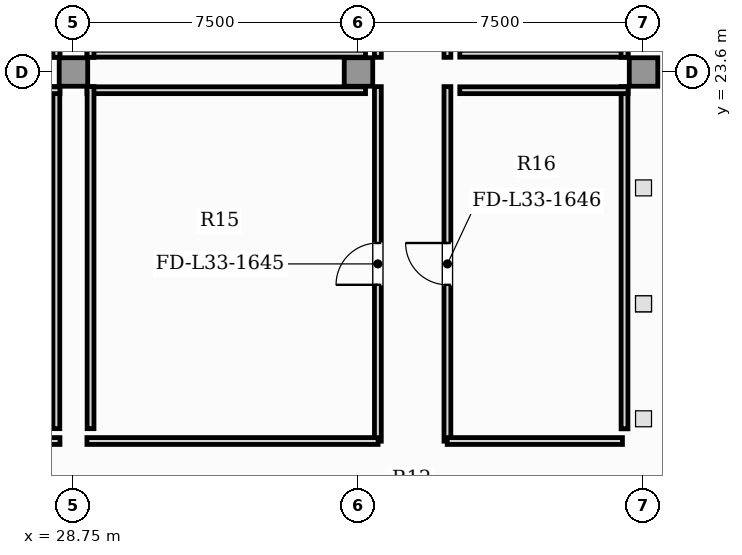
"""IFC4 building model, lengths in metres.
Left out: names, types, materials, properties, quantities, classifications, styles, units other than length and angle.
Written with IfcOpenShell. Run it as: python <this file> out.ifc"""

import sys

from ifc_helpers import new_model, si_unit, direction, frame, frame_2d, origin, origin_2d, place, context, subcontext, project, spatial, rectangle, extrude, element, fill, save


model = new_model("IFC4")
c1 = context("Model", 3, precision=1e-05, world=origin(), true_north=direction((0.0, 1.0)))
c2 = subcontext(c1, "Body", "Model", "MODEL_VIEW")
j1 = project(units=[si_unit("LENGTHUNIT", "METRE"), si_unit("PLANEANGLEUNIT", "RADIAN")], contexts=[c1])
p1 = place(None, origin())
s1 = spatial("IfcSite", under=j1, at=p1, CompositionType="ELEMENT")
p2 = place(p1, origin())
s2 = spatial("IfcBuilding", under=s1, at=p2, CompositionType="ELEMENT")
p3 = place(p2, frame((0.0, 0.0, 134.95)))
s3 = spatial("IfcBuildingStorey", under=s2, at=p3, CompositionType="ELEMENT", Elevation=134.95)
for number, where, z_axis, x_axis in (
    (1, (28.75, 23.6, 0.0), (0.0, 0.0, 1.0), (1.0, 0.0, 0.0)),
    (2, (36.25, 23.6, 0.0), (0.0, 0.0, 1.0), (1.0, 0.0, 0.0)),
    (3, (43.75, 23.6, 0.0), (0.0, 0.0, 1.0), (1.0, 0.0, 0.0)),
):
    element("IfcColumn", number, at=place(p3, frame(where, z_axis=z_axis, x_axis=x_axis)), inside=s3, PredefinedType="COLUMN", context=c2, shape_type="SweptSolid", body=[
        extrude(rectangle(XDim=0.75, YDim=0.75, at=origin_2d()), origin(), (0.0, 0.0, 1.0), 5.2),
    ])
p4 = place(p3, frame((21.605, 13.89, 0.0), z_axis=(0.0, 0.0, 1.0), x_axis=(1.0, 0.0, 0.0)))
e4 = element("IfcWall", 4, at=p4, inside=s3, PredefinedType="PARTITIONING", context=c2, shape_type="SweptSolid", body=[
    extrude(rectangle(XDim=6.79, YDim=0.18, at=frame_2d((3.395, 0.0))), origin(), (0.0, 0.0, 1.0), 4.92),
])
p5 = place(p4, frame((2.845, 0.0, 0.0)))
e5 = element("IfcOpeningElement", 5, at=p5, cuts=e4, PredefinedType="OPENING", context=c2, shape_type="SweptSolid", body=[
    extrude(rectangle(XDim=1.1, YDim=2.2, at=frame_2d((0.55, 1.1))), frame((0.0, 0.1, 0.0), z_axis=(0.0, -1.0, 0.0), x_axis=(1.0, 0.0, 0.0)), (0.0, 0.0, 1.0), 0.2),
])
p6 = place(p3, frame((36.76, 13.885, 0.0), z_axis=(0.0, 0.0, 1.0), x_axis=(0.0, 1.0, 0.0)))
e6 = element("IfcWall", 6, at=p6, inside=s3, PredefinedType="PARTITIONING", context=c2, shape_type="SweptSolid", body=[
    extrude(rectangle(XDim=9.33, YDim=0.18, at=frame_2d((4.665, 0.0))), origin(), (0.0, 0.0, 1.0), 4.92),
])
p7 = place(p6, frame((4.115, 0.0, 0.0)))
e7 = element("IfcOpeningElement", 7, at=p7, cuts=e6, PredefinedType="OPENING", context=c2, shape_type="SweptSolid", body=[
    extrude(rectangle(XDim=1.1, YDim=2.2, at=frame_2d((0.55, 1.1))), frame((0.0, 0.1, 0.0), z_axis=(0.0, -1.0, 0.0), x_axis=(1.0, 0.0, 0.0)), (0.0, 0.0, 1.0), 0.2),
])
p8 = place(p3, frame((29.105, 13.89, 0.0), z_axis=(0.0, 0.0, 1.0), x_axis=(1.0, 0.0, 0.0)))
e8 = element("IfcWall", 8, at=p8, inside=s3, PredefinedType="PARTITIONING", context=c2, shape_type="SweptSolid", body=[
    extrude(rectangle(XDim=7.66, YDim=0.18, at=frame_2d((3.83, 0.0))), origin(), (0.0, 0.0, 1.0), 4.92),
])
p9 = place(p3, frame((38.59, 13.885, 0.0), z_axis=(0.0, 0.0, 1.0), x_axis=(0.0, 1.0, 0.0)))
e9 = element("IfcWall", 9, at=p9, inside=s3, PredefinedType="PARTITIONING", context=c2, shape_type="SweptSolid", body=[
    extrude(rectangle(XDim=9.33, YDim=0.18, at=frame_2d((4.665, 0.0))), origin(), (0.0, 0.0, 1.0), 4.92),
])
p10 = place(p9, frame((4.115, 0.0, 0.0)))
e10 = element("IfcOpeningElement", 10, at=p10, cuts=e9, PredefinedType="OPENING", context=c2, shape_type="SweptSolid", body=[
    extrude(rectangle(XDim=1.1, YDim=2.2, at=frame_2d((0.55, 1.1))), frame((0.0, 0.1, 0.0), z_axis=(0.0, -1.0, 0.0), x_axis=(1.0, 0.0, 0.0)), (0.0, 0.0, 1.0), 0.2),
])
p11 = place(p3, frame((38.585, 13.89, 0.0), z_axis=(0.0, 0.0, 1.0), x_axis=(1.0, 0.0, 0.0)))
e11 = element("IfcWall", 11, at=p11, inside=s3, PredefinedType="PARTITIONING", context=c2, shape_type="SweptSolid", body=[
    extrude(rectangle(XDim=4.61, YDim=0.18, at=frame_2d((2.305, 0.0))), origin(), (0.0, 0.0, 1.0), 4.92),
])
p12 = place(p3, frame((36.76, 23.985, 0.0), z_axis=(0.0, 0.0, 1.0), x_axis=(0.0, 1.0, 0.0)))
e12 = element("IfcWall", 12, at=p12, inside=s3, PredefinedType="PARTITIONING", context=c2, shape_type="SweptSolid", body=[
    extrude(rectangle(XDim=4.13, YDim=0.18, at=frame_2d((2.065, 0.0))), origin(), (0.0, 0.0, 1.0), 4.92),
])
p13 = place(p12, frame((1.515, 0.0, 0.0)))
e13 = element("IfcOpeningElement", 13, at=p13, cuts=e12, PredefinedType="OPENING", context=c2, shape_type="SweptSolid", body=[
    extrude(rectangle(XDim=1.1, YDim=2.2, at=frame_2d((0.55, 1.1))), frame((0.0, 0.1, 0.0), z_axis=(0.0, -1.0, 0.0), x_axis=(1.0, 0.0, 0.0)), (0.0, 0.0, 1.0), 0.2),
])
p14 = place(p3, frame((38.59, 23.985, 0.0), z_axis=(0.0, 0.0, 1.0), x_axis=(0.0, 1.0, 0.0)))
e14 = element("IfcWall", 14, at=p14, inside=s3, PredefinedType="PARTITIONING", context=c2, shape_type="SweptSolid", body=[
    extrude(rectangle(XDim=2.13, YDim=0.18, at=frame_2d((1.065, 0.0))), origin(), (0.0, 0.0, 1.0), 4.92),
])
p15 = place(p14, frame((0.515, 0.0, 0.0)))
e15 = element("IfcOpeningElement", 15, at=p15, cuts=e14, PredefinedType="OPENING", context=c2, shape_type="SweptSolid", body=[
    extrude(rectangle(XDim=1.1, YDim=2.2, at=frame_2d((0.55, 1.1))), frame((0.0, 0.1, 0.0), z_axis=(0.0, -1.0, 0.0), x_axis=(1.0, 0.0, 0.0)), (0.0, 0.0, 1.0), 0.2),
])
p16 = place(p3, frame((28.3, 14.215, 0.0), z_axis=(0.0, 0.0, 1.0), x_axis=(0.0, 1.0, 0.0)))
e16 = element("IfcWall", 16, at=p16, inside=s3, PredefinedType="PARTITIONING", context=c2, shape_type="SweptSolid", body=[
    extrude(rectangle(XDim=9.0, YDim=0.18, at=frame_2d((4.5, 0.0))), origin(), (0.0, 0.0, 1.0), 4.92),
])
p17 = place(p3, frame((28.395, 23.12, 0.0), z_axis=(0.0, 0.0, 1.0), x_axis=(-1.0, 0.0, 0.0)))
e17 = element("IfcWall", 17, at=p17, inside=s3, PredefinedType="PARTITIONING", context=c2, shape_type="SweptSolid", body=[
    extrude(rectangle(XDim=6.79, YDim=0.18, at=frame_2d((3.395, 0.0))), origin(), (0.0, 0.0, 1.0), 4.92),
])
p18 = place(p3, frame((36.435, 23.12, 0.0), z_axis=(0.0, 0.0, 1.0), x_axis=(-1.0, 0.0, 0.0)))
e18 = element("IfcWall", 18, at=p18, inside=s3, PredefinedType="PARTITIONING", context=c2, shape_type="SweptSolid", body=[
    extrude(rectangle(XDim=7.33, YDim=0.18, at=frame_2d((3.665, 0.0))), origin(), (0.0, 0.0, 1.0), 4.92),
])
p19 = place(p3, frame((29.2, 23.215, 0.0), z_axis=(0.0, 0.0, 1.0), x_axis=(0.0, -1.0, 0.0)))
e19 = element("IfcWall", 19, at=p19, inside=s3, PredefinedType="PARTITIONING", context=c2, shape_type="SweptSolid", body=[
    extrude(rectangle(XDim=9.0, YDim=0.18, at=frame_2d((4.5, 0.0))), origin(), (0.0, 0.0, 1.0), 4.92),
])
p20 = place(p3, frame((43.25, 14.211, 0.0), z_axis=(0.0, 0.0, 1.0), x_axis=(0.0, 1.0, 0.0)))
e20 = element("IfcWall", 20, at=p20, inside=s3, PredefinedType="PARTITIONING", context=c2, shape_type="SweptSolid", body=[
    extrude(rectangle(XDim=9.004, YDim=0.18, at=frame_2d((4.502, 0.0))), origin(), (0.0, 0.0, 1.0), 4.92),
])
p21 = place(p3, frame((43.345, 23.12, 0.0), z_axis=(0.0, 0.0, 1.0), x_axis=(-1.0, 0.0, 0.0)))
e21 = element("IfcWall", 21, at=p21, inside=s3, PredefinedType="PARTITIONING", context=c2, shape_type="SweptSolid", body=[
    extrude(rectangle(XDim=4.43, YDim=0.18, at=frame_2d((2.215, 0.0))), origin(), (0.0, 0.0, 1.0), 4.92),
])
p22 = place(p3, frame((21.065, 24.08, 0.0), z_axis=(0.0, 0.0, 1.0), x_axis=(1.0, 0.0, 0.0)))
e22 = element("IfcWall", 22, at=p22, inside=s3, PredefinedType="PARTITIONING", context=c2, shape_type="SweptSolid", body=[
    extrude(rectangle(XDim=7.33, YDim=0.18, at=frame_2d((3.665, 0.0))), origin(), (0.0, 0.0, 1.0), 4.92),
])
p23 = place(p3, frame((28.3, 23.985, 0.0), z_axis=(0.0, 0.0, 1.0), x_axis=(0.0, 1.0, 0.0)))
e23 = element("IfcWall", 23, at=p23, inside=s3, PredefinedType="PARTITIONING", context=c2, shape_type="SweptSolid", body=[
    extrude(rectangle(XDim=4.13, YDim=0.18, at=frame_2d((2.065, 0.0))), origin(), (0.0, 0.0, 1.0), 4.92),
])
p24 = place(p3, frame((29.105, 24.08, 0.0), z_axis=(0.0, 0.0, 1.0), x_axis=(1.0, 0.0, 0.0)))
e24 = element("IfcWall", 24, at=p24, inside=s3, PredefinedType="PARTITIONING", context=c2, shape_type="SweptSolid", body=[
    extrude(rectangle(XDim=7.33, YDim=0.18, at=frame_2d((3.665, 0.0))), origin(), (0.0, 0.0, 1.0), 4.92),
])
p25 = place(p3, frame((29.2, 28.115, 0.0), z_axis=(0.0, 0.0, 1.0), x_axis=(0.0, -1.0, 0.0)))
e25 = element("IfcWall", 25, at=p25, inside=s3, PredefinedType="PARTITIONING", context=c2, shape_type="SweptSolid", body=[
    extrude(rectangle(XDim=4.13, YDim=0.18, at=frame_2d((2.065, 0.0))), origin(), (0.0, 0.0, 1.0), 4.92),
])
p26 = place(p3, frame((38.915, 24.08, 0.0), z_axis=(0.0, 0.0, 1.0), x_axis=(1.0, 0.0, 0.0)))
e26 = element("IfcWall", 26, at=p26, inside=s3, PredefinedType="PARTITIONING", context=c2, shape_type="SweptSolid", body=[
    extrude(rectangle(XDim=4.43, YDim=0.18, at=frame_2d((2.215, 0.0))), origin(), (0.0, 0.0, 1.0), 4.92),
])
p27 = place(p3, frame((43.25, 23.985, 0.0), z_axis=(0.0, 0.0, 1.0), x_axis=(0.0, 1.0, 0.0)))
e27 = element("IfcWall", 27, at=p27, inside=s3, PredefinedType="PARTITIONING", context=c2, shape_type="SweptSolid", body=[
    extrude(rectangle(XDim=1.804, YDim=0.18, at=frame_2d((0.902, 0.0))), origin(), (0.0, 0.0, 1.0), 4.92),
])
p28 = place(p7, origin())
e28 = element("IfcDoor", 28, at=p28, inside=s3, OperationType="SINGLE_SWING_LEFT", PredefinedType="DOOR", context=c2, shape_type="SweptSolid", body=[
    extrude(rectangle(XDim=1.1, YDim=2.2, at=frame_2d((0.55, 1.1))), frame((0.0, 0.025, 0.0), z_axis=(0.0, -1.0, 0.0), x_axis=(1.0, 0.0, 0.0)), (0.0, 0.0, 1.0), 0.05),
])
fill(e7, e28)
p29 = place(p10, origin())
e29 = element("IfcDoor", 29, at=p29, inside=s3, OperationType="SINGLE_SWING_RIGHT", PredefinedType="DOOR", context=c2, shape_type="SweptSolid", body=[
    extrude(rectangle(XDim=1.1, YDim=2.2, at=frame_2d((0.55, 1.1))), frame((0.0, 0.025, 0.0), z_axis=(0.0, -1.0, 0.0), x_axis=(1.0, 0.0, 0.0)), (0.0, 0.0, 1.0), 0.05),
])
fill(e10, e29)
save(model, sys.argv[1])
